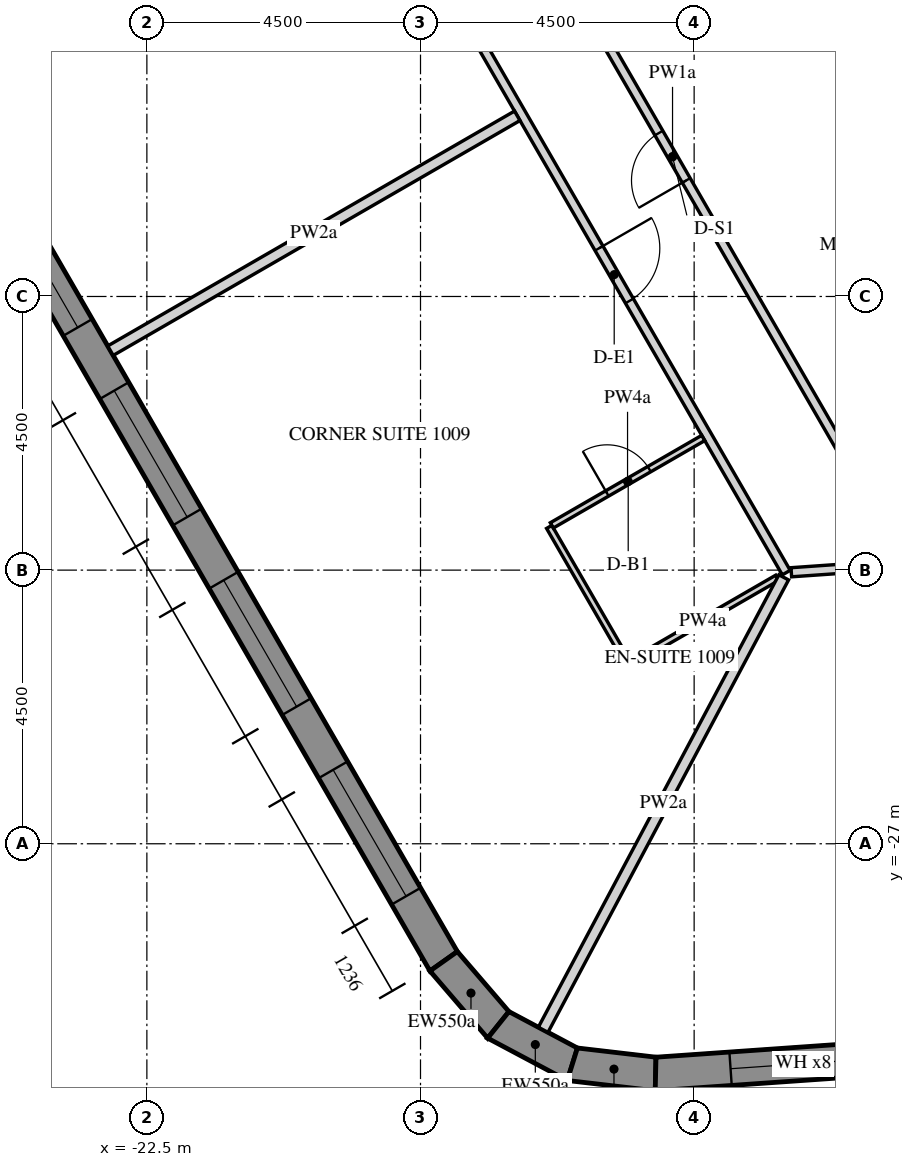
"""IFC4 building model, lengths in metres.
Left out: names, types, materials, properties, quantities, classifications, styles, units other than length and angle.
Written with IfcOpenShell. Run it as: python <this file> out.ifc"""

import sys

from ifc_helpers import new_model, si_unit, direction, frame, frame_2d, origin, place, context, subcontext, project, spatial, polyline, rectangle, outline, extrude, element, fill, save


model = new_model("IFC4")
c1 = context("Model", 3, precision=1e-05, world=origin(), true_north=direction((0.0, 1.0)))
c2 = subcontext(c1, "Body", "Model", "MODEL_VIEW")
j1 = project(units=[si_unit("LENGTHUNIT", "METRE"), si_unit("PLANEANGLEUNIT", "RADIAN")], contexts=[c1])
p1 = place(None, origin())
s1 = spatial("IfcSite", under=j1, at=p1, CompositionType="ELEMENT")
p2 = place(p1, origin())
s2 = spatial("IfcBuilding", under=s1, at=p2, CompositionType="ELEMENT")
p3 = place(p2, frame((0.0, 0.0, 142.8)))
s3 = spatial("IfcBuildingStorey", under=s2, at=p3, CompositionType="ELEMENT", Elevation=142.8)
p4 = place(p3, frame((-32.655, -2.89, -0.15), z_axis=(0.0, 0.0, 1.0), x_axis=(0.499997711317, -0.866026725152, 0.0)))
e1 = element("IfcWall", 1, at=p4, inside=s3, PredefinedType="SOLIDWALL", context=c2, shape_type="SweptSolid", body=[
    extrude(outline(polyline([(-0.022, -0.275), (30.097, -0.275), (30.045, 0.275), (0.022, 0.275), (-0.022, -0.275)])), origin(), (0.0, 0.0, 1.0), 3.75),
])
p5 = place(p4, frame((1.236, 0.0, 1.05)))
e2 = element("IfcOpeningElement", 2, at=p5, cuts=e1, PredefinedType="OPENING", context=c2, shape_type="SweptSolid", body=[
    extrude(rectangle(XDim=2.4, YDim=2.4, at=frame_2d((1.2, 1.2))), frame((0.0, 0.285, 0.0), z_axis=(0.0, -1.0, 0.0), x_axis=(1.0, 0.0, 0.0)), (0.0, 0.0, 1.0), 0.57),
])
p6 = place(p4, frame((4.835, 0.0, 1.05)))
e3 = element("IfcOpeningElement", 3, at=p6, cuts=e1, PredefinedType="OPENING", context=c2, shape_type="SweptSolid", body=[
    extrude(rectangle(XDim=2.4, YDim=2.4, at=frame_2d((1.2, 1.2))), frame((0.0, 0.285, 0.0), z_axis=(0.0, -1.0, 0.0), x_axis=(1.0, 0.0, 0.0)), (0.0, 0.0, 1.0), 0.57),
])
p7 = place(p4, frame((8.436, 0.0, 1.05)))
e4 = element("IfcOpeningElement", 4, at=p7, cuts=e1, PredefinedType="OPENING", context=c2, shape_type="SweptSolid", body=[
    extrude(rectangle(XDim=2.4, YDim=2.4, at=frame_2d((1.2, 1.2))), frame((0.0, 0.285, 0.0), z_axis=(0.0, -1.0, 0.0), x_axis=(1.0, 0.0, 0.0)), (0.0, 0.0, 1.0), 0.57),
])
p8 = place(p4, frame((12.035, 0.0, 1.05)))
e5 = element("IfcOpeningElement", 5, at=p8, cuts=e1, PredefinedType="OPENING", context=c2, shape_type="SweptSolid", body=[
    extrude(rectangle(XDim=2.4, YDim=2.4, at=frame_2d((1.2, 1.2))), frame((0.0, 0.285, 0.0), z_axis=(0.0, -1.0, 0.0), x_axis=(1.0, 0.0, 0.0)), (0.0, 0.0, 1.0), 0.57),
])
p9 = place(p4, frame((15.635, 0.0, 1.05)))
e6 = element("IfcOpeningElement", 6, at=p9, cuts=e1, PredefinedType="OPENING", context=c2, shape_type="SweptSolid", body=[
    extrude(rectangle(XDim=2.4, YDim=2.4, at=frame_2d((1.2, 1.2))), frame((0.0, 0.285, 0.0), z_axis=(0.0, -1.0, 0.0), x_axis=(1.0, 0.0, 0.0)), (0.0, 0.0, 1.0), 0.57),
])
p10 = place(p4, frame((19.236, 0.0, 1.05)))
e7 = element("IfcOpeningElement", 7, at=p10, cuts=e1, PredefinedType="OPENING", context=c2, shape_type="SweptSolid", body=[
    extrude(rectangle(XDim=2.4, YDim=2.4, at=frame_2d((1.2, 1.2))), frame((0.0, 0.285, 0.0), z_axis=(0.0, -1.0, 0.0), x_axis=(1.0, 0.0, 0.0)), (0.0, 0.0, 1.0), 0.57),
])
p11 = place(p4, frame((22.835, 0.0, 1.05)))
e8 = element("IfcOpeningElement", 8, at=p11, cuts=e1, PredefinedType="OPENING", context=c2, shape_type="SweptSolid", body=[
    extrude(rectangle(XDim=2.4, YDim=2.4, at=frame_2d((1.2, 1.2))), frame((0.0, 0.285, 0.0), z_axis=(0.0, -1.0, 0.0), x_axis=(1.0, 0.0, 0.0)), (0.0, 0.0, 1.0), 0.57),
])
p12 = place(p4, frame((26.436, 0.0, 1.05)))
e9 = element("IfcOpeningElement", 9, at=p12, cuts=e1, PredefinedType="OPENING", context=c2, shape_type="SweptSolid", body=[
    extrude(rectangle(XDim=2.4, YDim=2.4, at=frame_2d((1.2, 1.2))), frame((0.0, 0.285, 0.0), z_axis=(0.0, -1.0, 0.0), x_axis=(1.0, 0.0, 0.0)), (0.0, 0.0, 1.0), 0.57),
])
p13 = place(p3, frame((-17.619, -28.932, -0.15), z_axis=(0.0, 0.0, 1.0), x_axis=(0.651621950847, -0.758543890078, 0.0)))
e10 = element("IfcWall", 10, at=p13, inside=s3, PredefinedType="SOLIDWALL", context=c2, shape_type="SweptSolid", body=[
    extrude(outline(polyline([(-0.026, -0.275), (1.431, -0.275), (1.327, 0.275), (0.026, 0.275), (-0.026, -0.275)])), origin(), (0.0, 0.0, 1.0), 3.75),
])
p14 = place(p3, frame((-16.721, -29.979, -0.15), z_axis=(0.0, 0.0, 1.0), x_axis=(0.882994189209, -0.469383917304, 0.0)))
e11 = element("IfcWall", 11, at=p14, inside=s3, PredefinedType="SOLIDWALL", context=c2, shape_type="SweptSolid", body=[
    extrude(outline(polyline([(-0.052, -0.275), (1.431, -0.275), (1.327, 0.275), (0.052, 0.275), (-0.052, -0.275)])), origin(), (0.0, 0.0, 1.0), 3.75),
])
p15 = place(p3, frame((-15.503, -30.626, -0.15), z_axis=(0.0, 0.0, 1.0), x_axis=(0.993232537394, -0.11614269956, 0.0)))
e12 = element("IfcWall", 12, at=p15, inside=s3, PredefinedType="SOLIDWALL", context=c2, shape_type="SweptSolid", body=[
    extrude(outline(polyline([(-0.052, -0.275), (1.405, -0.275), (1.353, 0.275), (0.052, 0.275), (-0.052, -0.275)])), origin(), (0.0, 0.0, 1.0), 3.75),
])
p16 = place(p3, frame((-14.134, -30.786, -0.15), z_axis=(0.0, 0.0, 1.0), x_axis=(0.997564037441, 0.069756657061, 0.0)))
e13 = element("IfcWall", 13, at=p16, inside=s3, PredefinedType="SOLIDWALL", context=c2, shape_type="SweptSolid", body=[
    extrude(outline(polyline([(-0.026, -0.275), (30.094, -0.275), (30.049, 0.275), (0.026, 0.275), (-0.026, -0.275)])), origin(), (0.0, 0.0, 1.0), 3.75),
])
p17 = place(p16, frame((1.236, 0.0, 1.05)))
e14 = element("IfcOpeningElement", 14, at=p17, cuts=e13, PredefinedType="OPENING", context=c2, shape_type="SweptSolid", body=[
    extrude(rectangle(XDim=2.4, YDim=2.4, at=frame_2d((1.2, 1.2))), frame((0.0, 0.285, 0.0), z_axis=(0.0, -1.0, 0.0), x_axis=(1.0, 0.0, 0.0)), (0.0, 0.0, 1.0), 0.57),
])
p18 = place(p16, frame((4.835, 0.0, 1.05)))
e15 = element("IfcOpeningElement", 15, at=p18, cuts=e13, PredefinedType="OPENING", context=c2, shape_type="SweptSolid", body=[
    extrude(rectangle(XDim=2.4, YDim=2.4, at=frame_2d((1.2, 1.2))), frame((0.0, 0.285, 0.0), z_axis=(0.0, -1.0, 0.0), x_axis=(1.0, 0.0, 0.0)), (0.0, 0.0, 1.0), 0.57),
])
p19 = place(p16, frame((8.436, 0.0, 1.05)))
e16 = element("IfcOpeningElement", 16, at=p19, cuts=e13, PredefinedType="OPENING", context=c2, shape_type="SweptSolid", body=[
    extrude(rectangle(XDim=2.4, YDim=2.4, at=frame_2d((1.2, 1.2))), frame((0.0, 0.285, 0.0), z_axis=(0.0, -1.0, 0.0), x_axis=(1.0, 0.0, 0.0)), (0.0, 0.0, 1.0), 0.57),
])
p20 = place(p16, frame((12.035, 0.0, 1.05)))
e17 = element("IfcOpeningElement", 17, at=p20, cuts=e13, PredefinedType="OPENING", context=c2, shape_type="SweptSolid", body=[
    extrude(rectangle(XDim=2.4, YDim=2.4, at=frame_2d((1.2, 1.2))), frame((0.0, 0.285, 0.0), z_axis=(0.0, -1.0, 0.0), x_axis=(1.0, 0.0, 0.0)), (0.0, 0.0, 1.0), 0.57),
])
p21 = place(p16, frame((15.635, 0.0, 1.05)))
e18 = element("IfcOpeningElement", 18, at=p21, cuts=e13, PredefinedType="OPENING", context=c2, shape_type="SweptSolid", body=[
    extrude(rectangle(XDim=2.4, YDim=2.4, at=frame_2d((1.2, 1.2))), frame((0.0, 0.285, 0.0), z_axis=(0.0, -1.0, 0.0), x_axis=(1.0, 0.0, 0.0)), (0.0, 0.0, 1.0), 0.57),
])
p22 = place(p16, frame((19.236, 0.0, 1.05)))
e19 = element("IfcOpeningElement", 19, at=p22, cuts=e13, PredefinedType="OPENING", context=c2, shape_type="SweptSolid", body=[
    extrude(rectangle(XDim=2.4, YDim=2.4, at=frame_2d((1.2, 1.2))), frame((0.0, 0.285, 0.0), z_axis=(0.0, -1.0, 0.0), x_axis=(1.0, 0.0, 0.0)), (0.0, 0.0, 1.0), 0.57),
])
p23 = place(p16, frame((22.835, 0.0, 1.05)))
e20 = element("IfcOpeningElement", 20, at=p23, cuts=e13, PredefinedType="OPENING", context=c2, shape_type="SweptSolid", body=[
    extrude(rectangle(XDim=2.4, YDim=2.4, at=frame_2d((1.2, 1.2))), frame((0.0, 0.285, 0.0), z_axis=(0.0, -1.0, 0.0), x_axis=(1.0, 0.0, 0.0)), (0.0, 0.0, 1.0), 0.57),
])
p24 = place(p16, frame((26.436, 0.0, 1.05)))
e21 = element("IfcOpeningElement", 21, at=p24, cuts=e13, PredefinedType="OPENING", context=c2, shape_type="SweptSolid", body=[
    extrude(rectangle(XDim=2.4, YDim=2.4, at=frame_2d((1.2, 1.2))), frame((0.0, 0.285, 0.0), z_axis=(0.0, -1.0, 0.0), x_axis=(1.0, 0.0, 0.0)), (0.0, 0.0, 1.0), 0.57),
])
p25 = place(p3, frame((-15.819, 0.0, -0.15), z_axis=(0.0, 0.0, 1.0), x_axis=(0.499999880136, -0.866025472988, 0.0)))
e22 = element("IfcWall", 22, at=p25, inside=s3, PredefinedType="SHEAR", context=c2, shape_type="SweptSolid", body=[
    extrude(outline(polyline([(-0.173, -0.3), (15.993, -0.3), (15.646, 0.3), (0.173, 0.3), (-0.173, -0.3)])), origin(), (0.0, 0.0, 1.0), 3.75),
])
p26 = place(p25, frame((6.981, 0.0, 0.15)))
e23 = element("IfcOpeningElement", 23, at=p26, cuts=e22, PredefinedType="OPENING", context=c2, shape_type="SweptSolid", body=[
    extrude(rectangle(XDim=1.8, YDim=2.4, at=frame_2d((0.9, 1.2))), frame((0.0, 0.31, 0.0), z_axis=(0.0, -1.0, 0.0), x_axis=(1.0, 0.0, 0.0)), (0.0, 0.0, 1.0), 0.62),
])
p27 = place(p3, frame((-23.743, -2.175, 0.0), z_axis=(0.0, 0.0, 1.0), x_axis=(0.499992353047, -0.86602981871, 0.0)))
e24 = element("IfcWall", 24, at=p27, inside=s3, PredefinedType="PARTITIONING", context=c2, shape_type="SweptSolid", body=[
    extrude(rectangle(XDim=23.516, YDim=0.15, at=frame_2d((11.758, 0.0))), origin(), (0.0, 0.0, 1.0), 2.838),
])
p28 = place(p27, frame((10.099, 0.0, 0.0)))
e25 = element("IfcOpeningElement", 25, at=p28, cuts=e24, PredefinedType="OPENING", context=c2, shape_type="SweptSolid", body=[
    extrude(rectangle(XDim=1.0, YDim=2.1, at=frame_2d((0.5, 1.05))), frame((0.0, 0.085, 0.0), z_axis=(0.0, -1.0, 0.0), x_axis=(1.0, 0.0, 0.0)), (0.0, 0.0, 1.0), 0.17),
])
p29 = place(p27, frame((17.358, 0.0, 0.0)))
e26 = element("IfcOpeningElement", 26, at=p29, cuts=e24, PredefinedType="OPENING", context=c2, shape_type="SweptSolid", body=[
    extrude(rectangle(XDim=1.0, YDim=2.1, at=frame_2d((0.5, 1.05))), frame((0.0, 0.085, 0.0), z_axis=(0.0, -1.0, 0.0), x_axis=(1.0, 0.0, 0.0)), (0.0, 0.0, 1.0), 0.17),
])
p30 = place(p3, frame((-11.902, -22.535, 0.0), z_axis=(0.0, 0.0, 1.0), x_axis=(0.997563830208, 0.069759620556, 0.0)))
e27 = element("IfcWall", 27, at=p30, inside=s3, PredefinedType="PARTITIONING", context=c2, shape_type="SweptSolid", body=[
    extrude(rectangle(XDim=19.434, YDim=0.15, at=frame_2d((9.717, 0.0))), origin(), (0.0, 0.0, 1.0), 2.838),
])
p31 = place(p30, frame((2.575, 0.0, 0.0)))
e28 = element("IfcOpeningElement", 28, at=p31, cuts=e27, PredefinedType="OPENING", context=c2, shape_type="SweptSolid", body=[
    extrude(rectangle(XDim=1.0, YDim=2.1, at=frame_2d((0.5, 1.05))), frame((0.0, 0.085, 0.0), z_axis=(0.0, -1.0, 0.0), x_axis=(1.0, 0.0, 0.0)), (0.0, 0.0, 1.0), 0.17),
])
p32 = place(p30, frame((12.234, 0.0, 0.0)))
e29 = element("IfcOpeningElement", 29, at=p32, cuts=e27, PredefinedType="OPENING", context=c2, shape_type="SweptSolid", body=[
    extrude(rectangle(XDim=1.0, YDim=2.1, at=frame_2d((0.5, 1.05))), frame((0.0, 0.085, 0.0), z_axis=(0.0, -1.0, 0.0), x_axis=(1.0, 0.0, 0.0)), (0.0, 0.0, 1.0), 0.17),
])
p33 = place(p3, frame((-11.031, -20.595, 0.0), z_axis=(0.0, 0.0, 1.0), x_axis=(-0.499987422378, 0.866032665356, 0.0)))
e30 = element("IfcWall", 30, at=p33, inside=s3, PredefinedType="PARTITIONING", context=c2, shape_type="SweptSolid", body=[
    extrude(rectangle(XDim=11.299, YDim=0.15, at=frame_2d((5.649, 0.0))), origin(), (0.0, 0.0, 1.0), 2.838),
])
p34 = place(p33, frame((5.199, 0.0, 0.0)))
e31 = element("IfcOpeningElement", 31, at=p34, cuts=e30, PredefinedType="OPENING", context=c2, shape_type="SweptSolid", body=[
    extrude(rectangle(XDim=0.9, YDim=2.1, at=frame_2d((0.45, 1.05))), frame((0.0, 0.085, 0.0), z_axis=(0.0, -1.0, 0.0), x_axis=(1.0, 0.0, 0.0)), (0.0, 0.0, 1.0), 0.17),
])
p35 = place(p3, frame((-23.099, -18.892, 0.0), z_axis=(0.0, 0.0, 1.0), x_axis=(0.866019273868, 0.500010617176, 0.0)))
e32 = element("IfcWall", 32, at=p35, inside=s3, PredefinedType="PARTITIONING", context=c2, shape_type="SweptSolid", body=[
    extrude(rectangle(XDim=7.725, YDim=0.18, at=frame_2d((3.862, 0.0))), origin(), (0.0, 0.0, 1.0), 2.838),
])
p36 = place(p3, frame((-12.133, -22.626, 0.0), z_axis=(0.0, 0.0, 1.0), x_axis=(-0.866014564827, -0.500018773155, 0.0)))
e33 = element("IfcWall", 33, at=p36, inside=s3, PredefinedType="PARTITIONING", context=c2, shape_type="SweptSolid", body=[
    extrude(rectangle(XDim=2.829, YDim=0.1, at=frame_2d((1.415, 0.0))), origin(), (0.0, 0.0, 1.0), 2.838),
])
p37 = place(p3, frame((-14.608, -23.998, 0.0), z_axis=(0.0, 0.0, 1.0), x_axis=(-0.499990435942, 0.866030925526, 0.0)))
e34 = element("IfcWall", 34, at=p37, inside=s3, PredefinedType="PARTITIONING", context=c2, shape_type="SweptSolid", body=[
    extrude(rectangle(XDim=2.55, YDim=0.1, at=frame_2d((1.275, 0.0))), origin(), (0.0, 0.0, 1.0), 2.838),
])
p38 = place(p3, frame((-15.84, -21.764, 0.0), z_axis=(0.0, 0.0, 1.0), x_axis=(0.866039941686, 0.499974818771, 0.0)))
e35 = element("IfcWall", 35, at=p38, inside=s3, PredefinedType="PARTITIONING", context=c2, shape_type="SweptSolid", body=[
    extrude(rectangle(XDim=2.875, YDim=0.1, at=frame_2d((1.438, 0.0))), origin(), (0.0, 0.0, 1.0), 2.838),
])
p39 = place(p38, frame((1.05, 0.0, 0.0)))
e36 = element("IfcOpeningElement", 36, at=p39, cuts=e35, PredefinedType="OPENING", context=c2, shape_type="SweptSolid", body=[
    extrude(rectangle(XDim=0.8, YDim=2.1, at=frame_2d((0.4, 1.05))), frame((0.0, 0.06, 0.0), z_axis=(0.0, -1.0, 0.0), x_axis=(1.0, 0.0, 0.0)), (0.0, 0.0, 1.0), 0.12),
])
p40 = place(p3, frame((-15.983, -30.059, 0.0), z_axis=(0.0, 0.0, 1.0), x_axis=(0.469475065364, 0.882945730496, 0.0)))
e37 = element("IfcWall", 37, at=p40, inside=s3, PredefinedType="PARTITIONING", context=c2, shape_type="SweptSolid", body=[
    extrude(rectangle(XDim=8.427, YDim=0.18, at=frame_2d((4.213, 0.0))), origin(), (0.0, 0.0, 1.0), 2.838),
])
p41 = place(p9, frame((0.0, 0.205, 0.0)))
e38 = element("IfcWindow", 38, at=p41, inside=s3, PartitioningType="DOUBLE_PANEL_VERTICAL", PredefinedType="WINDOW", context=c2, shape_type="SweptSolid", body=[
    extrude(rectangle(XDim=2.4, YDim=2.4, at=frame_2d((1.2, 1.2))), frame((0.0, 0.03, 0.0), z_axis=(0.0, -1.0, 0.0), x_axis=(1.0, 0.0, 0.0)), (0.0, 0.0, 1.0), 0.06),
])
fill(e6, e38)
p42 = place(p10, frame((0.0, 0.205, 0.0)))
e39 = element("IfcWindow", 39, at=p42, inside=s3, PartitioningType="DOUBLE_PANEL_VERTICAL", PredefinedType="WINDOW", context=c2, shape_type="SweptSolid", body=[
    extrude(rectangle(XDim=2.4, YDim=2.4, at=frame_2d((1.2, 1.2))), frame((0.0, 0.03, 0.0), z_axis=(0.0, -1.0, 0.0), x_axis=(1.0, 0.0, 0.0)), (0.0, 0.0, 1.0), 0.06),
])
fill(e7, e39)
p43 = place(p11, frame((0.0, 0.205, 0.0)))
e40 = element("IfcWindow", 40, at=p43, inside=s3, PartitioningType="DOUBLE_PANEL_VERTICAL", PredefinedType="WINDOW", context=c2, shape_type="SweptSolid", body=[
    extrude(rectangle(XDim=2.4, YDim=2.4, at=frame_2d((1.2, 1.2))), frame((0.0, 0.03, 0.0), z_axis=(0.0, -1.0, 0.0), x_axis=(1.0, 0.0, 0.0)), (0.0, 0.0, 1.0), 0.06),
])
fill(e8, e40)
p44 = place(p12, frame((0.0, 0.205, 0.0)))
e41 = element("IfcWindow", 41, at=p44, inside=s3, PartitioningType="DOUBLE_PANEL_VERTICAL", PredefinedType="WINDOW", context=c2, shape_type="SweptSolid", body=[
    extrude(rectangle(XDim=2.4, YDim=2.4, at=frame_2d((1.2, 1.2))), frame((0.0, 0.03, 0.0), z_axis=(0.0, -1.0, 0.0), x_axis=(1.0, 0.0, 0.0)), (0.0, 0.0, 1.0), 0.06),
])
fill(e9, e41)
p45 = place(p17, frame((0.0, 0.205, 0.0)))
e42 = element("IfcWindow", 42, at=p45, inside=s3, PartitioningType="DOUBLE_PANEL_VERTICAL", PredefinedType="WINDOW", context=c2, shape_type="SweptSolid", body=[
    extrude(rectangle(XDim=2.4, YDim=2.4, at=frame_2d((1.2, 1.2))), frame((0.0, 0.03, 0.0), z_axis=(0.0, -1.0, 0.0), x_axis=(1.0, 0.0, 0.0)), (0.0, 0.0, 1.0), 0.06),
])
fill(e14, e42)
p46 = place(p29, origin())
e43 = element("IfcDoor", 43, at=p46, inside=s3, OperationType="SINGLE_SWING_RIGHT", PredefinedType="DOOR", context=c2, shape_type="SweptSolid", body=[
    extrude(rectangle(XDim=1.0, YDim=2.1, at=frame_2d((0.5, 1.05))), frame((0.0, 0.025, 0.0), z_axis=(0.0, -1.0, 0.0), x_axis=(1.0, 0.0, 0.0)), (0.0, 0.0, 1.0), 0.05),
])
fill(e26, e43)
p47 = place(p39, origin())
e44 = element("IfcDoor", 44, at=p47, inside=s3, OperationType="SINGLE_SWING_LEFT", PredefinedType="DOOR", context=c2, shape_type="SweptSolid", body=[
    extrude(rectangle(XDim=0.8, YDim=2.1, at=frame_2d((0.4, 1.05))), frame((0.0, 0.025, 0.0), z_axis=(0.0, -1.0, 0.0), x_axis=(1.0, 0.0, 0.0)), (0.0, 0.0, 1.0), 0.05),
])
fill(e36, e44)
p48 = place(p34, origin())
e45 = element("IfcDoor", 45, at=p48, inside=s3, OperationType="SINGLE_SWING_RIGHT", PredefinedType="DOOR", context=c2, shape_type="SweptSolid", body=[
    extrude(rectangle(XDim=0.9, YDim=2.1, at=frame_2d((0.45, 1.05))), frame((0.0, 0.025, 0.0), z_axis=(0.0, -1.0, 0.0), x_axis=(1.0, 0.0, 0.0)), (0.0, 0.0, 1.0), 0.05),
])
fill(e31, e45)
save(model, sys.argv[1])
